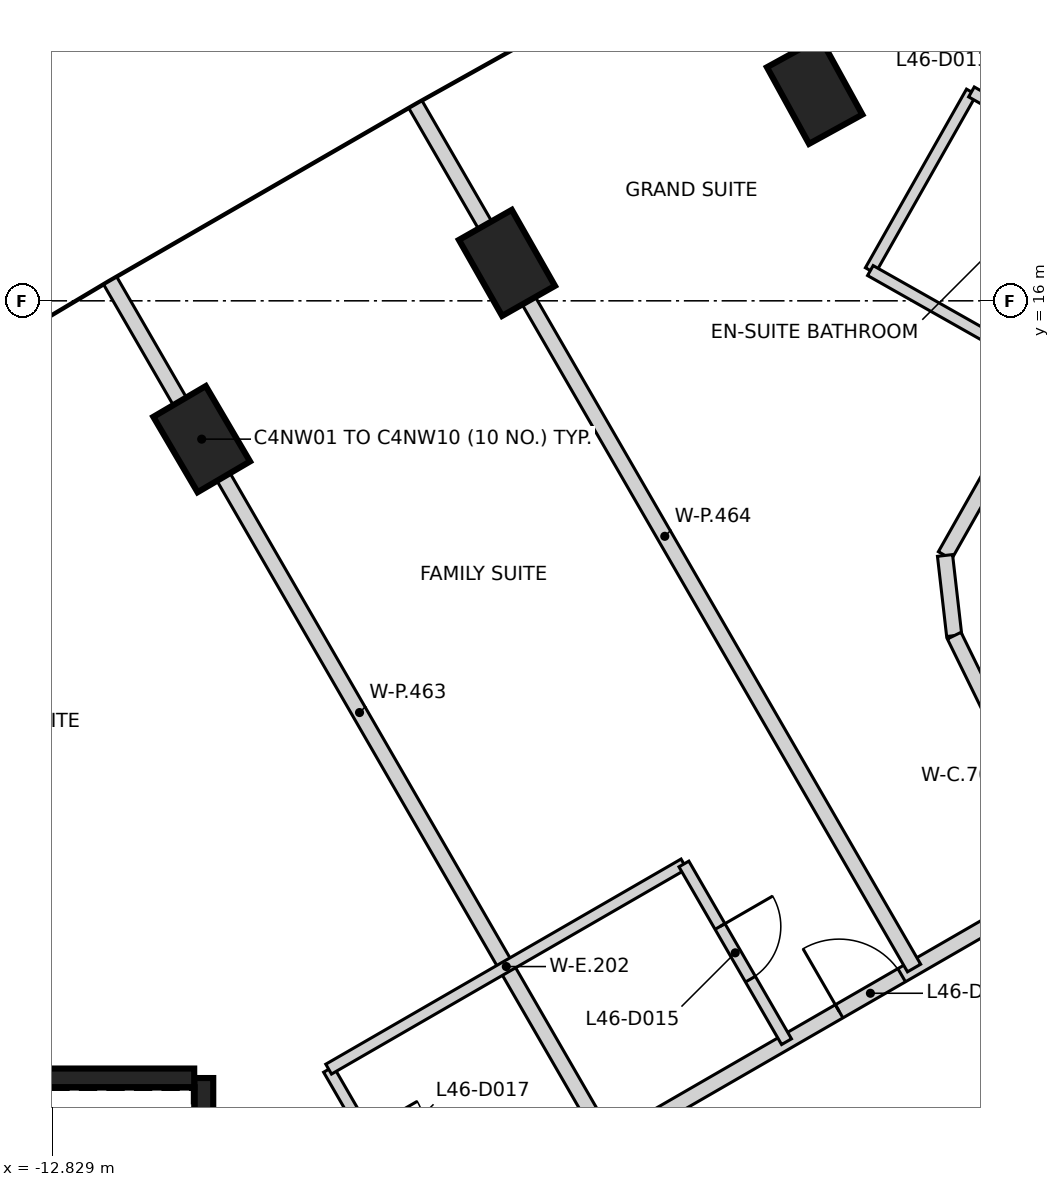
"""IFC4 building model, lengths in metres.
Left out: names, types, materials, properties, quantities, classifications, styles, units other than length and angle.
Written with IfcOpenShell. Run it as: python <this file> out.ifc"""

import sys

from ifc_helpers import new_model, si_unit, direction, frame, frame_2d, origin, origin_2d, place, context, subcontext, project, spatial, rectangle, extrude, element, fill, save


model = new_model("IFC4")
c1 = context("Model", 3, precision=1e-05, world=origin(), true_north=direction((0.0, 1.0)))
c2 = subcontext(c1, "Body", "Model", "MODEL_VIEW")
j1 = project(units=[si_unit("LENGTHUNIT", "METRE"), si_unit("PLANEANGLEUNIT", "RADIAN")], contexts=[c1])
p1 = place(None, origin())
s1 = spatial("IfcSite", under=j1, at=p1, CompositionType="ELEMENT")
p2 = place(p1, origin())
s2 = spatial("IfcBuilding", under=s1, at=p2, CompositionType="ELEMENT")
p3 = place(p2, frame((0.0, 0.0, 186.4)))
s3 = spatial("IfcBuildingStorey", under=s2, at=p3, CompositionType="ELEMENT", Elevation=186.4)
for number, where, z_axis, x_axis in (
    (1, (-2.8, 18.762, -0.35), (0.0, 0.0, 1.0), (-0.482, 0.876, 0.0)),
    (2, (-6.848, 16.499, -0.35), (0.0, 0.0, 1.0), (-0.494, 0.87, 0.0)),
    (3, (-10.864, 14.18, -0.35), (0.0, 0.0, 1.0), (-0.506, 0.862, 0.0)),
):
    element("IfcColumn", number, at=place(p3, frame(where, z_axis=z_axis, x_axis=x_axis)), inside=s3, PredefinedType="COLUMN", context=c2, shape_type="SweptSolid", body=[
        extrude(rectangle(XDim=1.15, YDim=0.8, at=origin_2d()), origin(), (0.0, 0.0, 1.0), 3.6),
    ])
p4 = place(p3, frame((-10.837, 5.775, 0.0), z_axis=(0.0, 0.0, 1.0), x_axis=(0.0, -1.0, 0.0)))
e4 = element("IfcWall", 4, at=p4, inside=s3, PredefinedType="SHEAR", context=c2, shape_type="SweptSolid", body=[
    extrude(rectangle(XDim=11.55, YDim=0.25, at=frame_2d((5.775, 0.0))), origin(), (0.0, 0.0, 1.0), 3.25),
])
p5 = place(p4, frame((10.025, 0.0, 0.0)))
e5 = element("IfcOpeningElement", 5, at=p5, cuts=e4, PredefinedType="OPENING", context=c2, shape_type="SweptSolid", body=[
    extrude(rectangle(XDim=1.2, YDim=2.1, at=frame_2d((0.6, 1.05))), frame((0.0, 0.135, 0.0), z_axis=(0.0, -1.0, 0.0), x_axis=(1.0, 0.0, 0.0)), (0.0, 0.0, 1.0), 0.27),
])
p6 = place(p4, frame((8.725, 0.0, 0.0)))
e6 = element("IfcOpeningElement", 6, at=p6, cuts=e4, PredefinedType="OPENING", context=c2, shape_type="SweptSolid", body=[
    extrude(rectangle(XDim=1.2, YDim=2.1, at=frame_2d((0.6, 1.05))), frame((0.0, 0.135, 0.0), z_axis=(0.0, -1.0, 0.0), x_axis=(1.0, 0.0, 0.0)), (0.0, 0.0, 1.0), 0.27),
])
p7 = place(p3, frame((-16.472, 5.775, 0.0), z_axis=(0.0, 0.0, 1.0), x_axis=(1.0, 0.0, 0.0)))
e7 = element("IfcWall", 7, at=p7, inside=s3, PredefinedType="SHEAR", context=c2, shape_type="SweptSolid", body=[
    extrude(rectangle(XDim=5.51, YDim=0.25, at=frame_2d((2.755, 0.0))), origin(), (0.0, 0.0, 1.0), 3.25),
])
p8 = place(p3, frame((-10.652, 1.934, 0.0), z_axis=(0.0, 0.0, 1.0), x_axis=(0.866066882415, 0.499928150021, 0.0)))
e8 = element("IfcWall", 8, at=p8, inside=s3, PredefinedType="PARTITIONING", context=c2, shape_type="SweptSolid", body=[
    extrude(rectangle(XDim=12.98, YDim=0.2, at=frame_2d((6.49, 0.0))), origin(), (0.0, 0.0, 1.0), 3.25),
])
p9 = place(p8, frame((9.439, 0.0, 0.0)))
e9 = element("IfcOpeningElement", 9, at=p9, cuts=e8, PredefinedType="OPENING", context=c2, shape_type="SweptSolid", body=[
    extrude(rectangle(XDim=0.95, YDim=2.1, at=frame_2d((0.475, 1.05))), frame((0.0, 0.11, 0.0), z_axis=(0.0, -1.0, 0.0), x_axis=(1.0, 0.0, 0.0)), (0.0, 0.0, 1.0), 0.22),
])
p10 = place(p8, frame((0.229, 0.0, 0.0)))
e10 = element("IfcOpeningElement", 10, at=p10, cuts=e8, PredefinedType="OPENING", context=c2, shape_type="SweptSolid", body=[
    extrude(rectangle(XDim=0.95, YDim=2.1, at=frame_2d((0.475, 1.05))), frame((0.0, 0.11, 0.0), z_axis=(0.0, -1.0, 0.0), x_axis=(1.0, 0.0, 0.0)), (0.0, 0.0, 1.0), 0.22),
])
p11 = place(p3, frame((-1.085, 12.65, 0.0), z_axis=(0.0, 0.0, 1.0), x_axis=(0.49243456751, 0.870349468157, 0.0)))
e11 = element("IfcWall", 11, at=p11, inside=s3, PredefinedType="PARTITIONING", context=c2, shape_type="SweptSolid", body=[
    extrude(rectangle(XDim=10.531, YDim=0.2, at=frame_2d((5.266, 0.0))), origin(), (0.0, 0.0, 1.0), 3.25),
])
p12 = place(p11, frame((7.499, 0.0, 0.0)))
e12 = element("IfcOpeningElement", 12, at=p12, cuts=e11, PredefinedType="OPENING", context=c2, shape_type="SweptSolid", body=[
    extrude(rectangle(XDim=1.0, YDim=2.1, at=frame_2d((0.5, 1.05))), frame((0.0, 0.11, 0.0), z_axis=(0.0, -1.0, 0.0), x_axis=(1.0, 0.0, 0.0)), (0.0, 0.0, 1.0), 0.22),
])
p13 = place(p3, frame((-1.085, 12.65, 0.0), z_axis=(0.0, 0.0, 1.0), x_axis=(0.113812454263, -0.993502252264, 0.0)))
e13 = element("IfcWall", 13, at=p13, inside=s3, PredefinedType="PARTITIONING", context=c2, shape_type="SweptSolid", body=[
    extrude(rectangle(XDim=1.062, YDim=0.2, at=frame_2d((0.531, 0.0))), origin(), (0.0, 0.0, 1.0), 3.25),
])
p14 = place(p3, frame((-0.964, 11.595, 0.0), z_axis=(0.0, 0.0, 1.0), x_axis=(0.439787800928, -0.898101714816, 0.0)))
e14 = element("IfcWall", 14, at=p14, inside=s3, PredefinedType="PARTITIONING", context=c2, shape_type="SweptSolid", body=[
    extrude(rectangle(XDim=3.532, YDim=0.2, at=frame_2d((1.766, 0.0))), origin(), (0.0, 0.0, 1.0), 3.25),
])
p15 = place(p14, frame((2.382, 0.0, 0.0)))
e15 = element("IfcOpeningElement", 15, at=p15, cuts=e14, PredefinedType="OPENING", context=c2, shape_type="SweptSolid", body=[
    extrude(rectangle(XDim=0.95, YDim=2.1, at=frame_2d((0.475, 1.05))), frame((0.0, 0.11, 0.0), z_axis=(0.0, -1.0, 0.0), x_axis=(1.0, 0.0, 0.0)), (0.0, 0.0, 1.0), 0.22),
])
p16 = place(p3, frame((-12.067, 16.263, 0.0), z_axis=(0.0, 0.0, 1.0), x_axis=(0.500016190239, -0.866016056144, 0.0)))
e16 = element("IfcWall", 16, at=p16, inside=s3, PredefinedType="PARTITIONING", context=c2, shape_type="SweptSolid", body=[
    extrude(rectangle(XDim=13.118, YDim=0.2, at=frame_2d((6.559, 0.0))), origin(), (0.0, 0.0, 1.0), 3.25),
])
p17 = place(p3, frame((-8.052, 18.582, 0.0), z_axis=(0.0, 0.0, 1.0), x_axis=(0.500046266189, -0.86599869034, 0.0)))
e17 = element("IfcWall", 17, at=p17, inside=s3, PredefinedType="PARTITIONING", context=c2, shape_type="SweptSolid", body=[
    extrude(rectangle(XDim=13.118, YDim=0.2, at=frame_2d((6.559, 0.0))), origin(), (0.0, 0.0, 1.0), 3.25),
])
p18 = place(p3, frame((-1.232, 22.345, 0.0), z_axis=(0.0, 0.0, 1.0), x_axis=(0.499942901263, -0.866058367246, 0.0)))
e18 = element("IfcWall", 18, at=p18, inside=s3, PredefinedType="PARTITIONING", context=c2, shape_type="SweptSolid", body=[
    extrude(rectangle(XDim=5.688, YDim=0.2, at=frame_2d((2.844, 0.0))), origin(), (0.0, 0.0, 1.0), 2.35),
])
p19 = place(p3, frame((-9.195, 5.889, 0.0), z_axis=(0.0, 0.0, 1.0), x_axis=(0.500129820725, -0.865950438779, 0.0)))
e19 = element("IfcWall", 19, at=p19, inside=s3, PredefinedType="PARTITIONING", context=c2, shape_type="SweptSolid", body=[
    extrude(rectangle(XDim=2.698, YDim=0.15, at=frame_2d((1.349, 0.0))), origin(), (0.0, 0.0, 1.0), 3.25),
])
p20 = place(p19, frame((0.948, 0.0, 0.0)))
e20 = element("IfcOpeningElement", 20, at=p20, cuts=e19, PredefinedType="OPENING", context=c2, shape_type="SweptSolid", body=[
    extrude(rectangle(XDim=0.8, YDim=2.1, at=frame_2d((0.4, 1.05))), frame((0.0, 0.085, 0.0), z_axis=(0.0, -1.0, 0.0), x_axis=(1.0, 0.0, 0.0)), (0.0, 0.0, 1.0), 0.17),
])
p21 = place(p3, frame((-9.194, 5.892, 0.0), z_axis=(0.0, 0.0, 1.0), x_axis=(0.8659934935, 0.500055266161, 0.0)))
e21 = element("IfcWall", 21, at=p21, inside=s3, PredefinedType="PARTITIONING", context=c2, shape_type="SweptSolid", body=[
    extrude(rectangle(XDim=5.397, YDim=0.15, at=frame_2d((2.699, 0.0))), origin(), (0.0, 0.0, 1.0), 3.25),
])
p22 = place(p3, frame((-4.52, 8.591, 0.0), z_axis=(0.0, 0.0, 1.0), x_axis=(0.500048589285, -0.86599734893, 0.0)))
e22 = element("IfcWall", 22, at=p22, inside=s3, PredefinedType="PARTITIONING", context=c2, shape_type="SweptSolid", body=[
    extrude(rectangle(XDim=2.7, YDim=0.15, at=frame_2d((1.35, 0.0))), origin(), (0.0, 0.0, 1.0), 3.25),
])
p23 = place(p22, frame((0.95, 0.0, 0.0)))
e23 = element("IfcOpeningElement", 23, at=p23, cuts=e22, PredefinedType="OPENING", context=c2, shape_type="SweptSolid", body=[
    extrude(rectangle(XDim=0.8, YDim=2.1, at=frame_2d((0.4, 1.05))), frame((0.0, 0.085, 0.0), z_axis=(0.0, -1.0, 0.0), x_axis=(1.0, 0.0, 0.0)), (0.0, 0.0, 1.0), 0.17),
])
p24 = place(p3, frame((-2.067, 16.398, 0.0), z_axis=(0.0, 0.0, 1.0), x_axis=(0.492483230042, 0.870321933613, 0.0)))
e24 = element("IfcWall", 24, at=p24, inside=s3, PredefinedType="PARTITIONING", context=c2, shape_type="SweptSolid", body=[
    extrude(rectangle(XDim=2.7, YDim=0.15, at=frame_2d((1.35, 0.0))), origin(), (0.0, 0.0, 1.0), 3.25),
])
p25 = place(p3, frame((-2.067, 16.398, 0.0), z_axis=(0.0, 0.0, 1.0), x_axis=(0.870300002118, -0.492521985614, 0.0)))
e25 = element("IfcWall", 25, at=p25, inside=s3, PredefinedType="PARTITIONING", context=c2, shape_type="SweptSolid", body=[
    extrude(rectangle(XDim=2.7, YDim=0.15, at=frame_2d((1.35, 0.0))), origin(), (0.0, 0.0, 1.0), 3.25),
])
p26 = place(p3, frame((-0.737, 18.748, 0.0), z_axis=(0.0, 0.0, 1.0), x_axis=(0.870283179633, -0.492551710227, 0.0)))
e26 = element("IfcWall", 26, at=p26, inside=s3, PredefinedType="PARTITIONING", context=c2, shape_type="SweptSolid", body=[
    extrude(rectangle(XDim=2.7, YDim=0.15, at=frame_2d((1.35, 0.0))), origin(), (0.0, 0.0, 1.0), 3.25),
])
p27 = place(p26, frame((0.95, 0.0, 0.0)))
e27 = element("IfcOpeningElement", 27, at=p27, cuts=e26, PredefinedType="OPENING", context=c2, shape_type="SweptSolid", body=[
    extrude(rectangle(XDim=0.8, YDim=2.1, at=frame_2d((0.4, 1.05))), frame((0.0, 0.085, 0.0), z_axis=(0.0, -1.0, 0.0), x_axis=(1.0, 0.0, 0.0)), (0.0, 0.0, 1.0), 0.17),
])
p28 = place(p9, origin())
e28 = element("IfcDoor", 28, at=p28, inside=s3, OperationType="SINGLE_SWING_LEFT", PredefinedType="DOOR", context=c2, shape_type="SweptSolid", body=[
    extrude(rectangle(XDim=0.95, YDim=2.1, at=frame_2d((0.475, 1.05))), frame((0.0, 0.025, 0.0), z_axis=(0.0, -1.0, 0.0), x_axis=(1.0, 0.0, 0.0)), (0.0, 0.0, 1.0), 0.05),
])
fill(e9, e28)
p29 = place(p23, frame((0.8, 0.0, 0.0), z_axis=(0.0, 0.0, 1.0), x_axis=(-1.0, 0.0, 0.0)))
e29 = element("IfcDoor", 29, at=p29, inside=s3, OperationType="SINGLE_SWING_LEFT", PredefinedType="DOOR", context=c2, shape_type="SweptSolid", body=[
    extrude(rectangle(XDim=0.8, YDim=2.1, at=frame_2d((0.4, 1.05))), frame((0.0, 0.025, 0.0), z_axis=(0.0, -1.0, 0.0), x_axis=(1.0, 0.0, 0.0)), (0.0, 0.0, 1.0), 0.05),
])
fill(e23, e29)
save(model, sys.argv[1])
